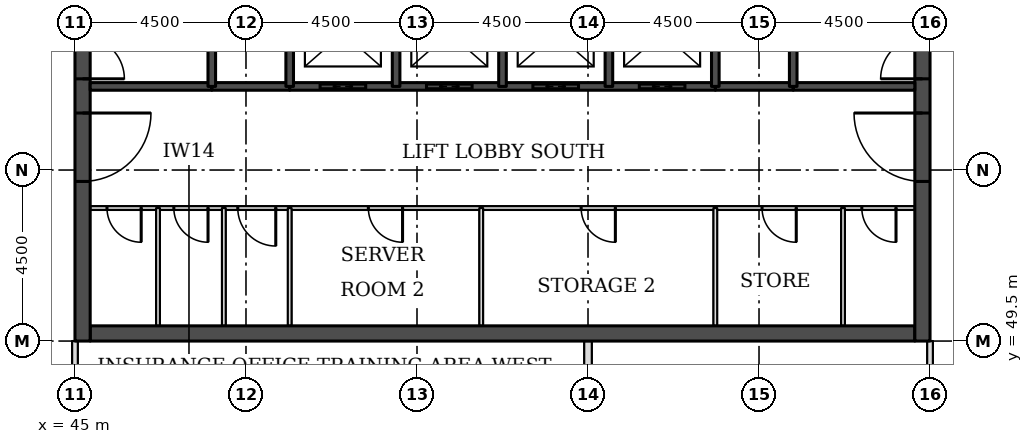
"""IFC4 building model, lengths in metres.
Left out: names, types, materials, properties, quantities, classifications, styles, units other than length and angle.
Written with IfcOpenShell. Run it as: python <this file> out.ifc"""

import sys

from ifc_helpers import new_model, si_unit, direction, frame, frame_2d, origin, place, context, subcontext, project, spatial, rectangle, extrude, element, fill, save


model = new_model("IFC4")
c1 = context("Model", 3, precision=1e-05, world=origin(), true_north=direction((0.0, 1.0)))
c2 = subcontext(c1, "Body", "Model", "MODEL_VIEW")
j1 = project(units=[si_unit("LENGTHUNIT", "METRE"), si_unit("PLANEANGLEUNIT", "RADIAN")], contexts=[c1])
p1 = place(None, origin())
s1 = spatial("IfcSite", under=j1, at=p1, CompositionType="ELEMENT")
p2 = place(p1, origin())
s2 = spatial("IfcBuilding", under=s1, at=p2, CompositionType="ELEMENT")
p3 = place(p2, frame((0.0, 0.0, 215.6)))
s3 = spatial("IfcBuildingStorey", under=s2, at=p3, CompositionType="ELEMENT", Elevation=215.6)
p4 = place(p3, frame((45.4, 49.7, 0.0), z_axis=(0.0, 0.0, 1.0), x_axis=(1.0, 0.0, 0.0)))
e1 = element("IfcWall", 1, at=p4, inside=s3, PredefinedType="SHEAR", context=c2, shape_type="SweptSolid", body=[
    extrude(rectangle(XDim=21.7, YDim=0.4, at=frame_2d((10.85, 0.0))), origin(), (0.0, 0.0, 1.0), 3.7),
])
p5 = place(p3, frame((45.2, 49.5, 0.0), z_axis=(0.0, 0.0, 1.0), x_axis=(0.0, 1.0, 0.0)))
e2 = element("IfcWall", 2, at=p5, inside=s3, PredefinedType="SHEAR", context=c2, shape_type="SweptSolid", body=[
    extrude(rectangle(XDim=22.5, YDim=0.4, at=frame_2d((11.25, 0.0))), origin(), (0.0, 0.0, 1.0), 3.7),
])
p6 = place(p5, frame((4.2, 0.0, 0.0)))
e3 = element("IfcOpeningElement", 3, at=p6, cuts=e2, PredefinedType="OPENING", context=c2, shape_type="SweptSolid", body=[
    extrude(rectangle(XDim=1.8, YDim=2.1, at=frame_2d((0.9, 1.05))), frame((0.0, 0.21, 0.0), z_axis=(0.0, -1.0, 0.0), x_axis=(1.0, 0.0, 0.0)), (0.0, 0.0, 1.0), 0.42),
])
p7 = place(p5, frame((6.9, 0.0, 0.0)))
e4 = element("IfcOpeningElement", 4, at=p7, cuts=e2, PredefinedType="OPENING", context=c2, shape_type="SweptSolid", body=[
    extrude(rectangle(XDim=1.1, YDim=2.1, at=frame_2d((0.55, 1.05))), frame((0.0, 0.21, 0.0), z_axis=(0.0, -1.0, 0.0), x_axis=(1.0, 0.0, 0.0)), (0.0, 0.0, 1.0), 0.42),
])
p8 = place(p5, frame((13.6, 0.0, 0.0)))
e5 = element("IfcOpeningElement", 5, at=p8, cuts=e2, PredefinedType="OPENING", context=c2, shape_type="SweptSolid", body=[
    extrude(rectangle(XDim=1.1, YDim=2.1, at=frame_2d((0.55, 1.05))), frame((0.0, 0.21, 0.0), z_axis=(0.0, -1.0, 0.0), x_axis=(1.0, 0.0, 0.0)), (0.0, 0.0, 1.0), 0.42),
])
p9 = place(p5, frame((16.5, 0.0, 0.0)))
e6 = element("IfcOpeningElement", 6, at=p9, cuts=e2, PredefinedType="OPENING", context=c2, shape_type="SweptSolid", body=[
    extrude(rectangle(XDim=1.8, YDim=2.1, at=frame_2d((0.9, 1.05))), frame((0.0, 0.21, 0.0), z_axis=(0.0, -1.0, 0.0), x_axis=(1.0, 0.0, 0.0)), (0.0, 0.0, 1.0), 0.42),
])
p10 = place(p3, frame((67.3, 49.5, 0.0), z_axis=(0.0, 0.0, 1.0), x_axis=(0.0, 1.0, 0.0)))
e7 = element("IfcWall", 7, at=p10, inside=s3, PredefinedType="SHEAR", context=c2, shape_type="SweptSolid", body=[
    extrude(rectangle(XDim=22.5, YDim=0.4, at=frame_2d((11.25, 0.0))), origin(), (0.0, 0.0, 1.0), 3.7),
])
p11 = place(p10, frame((4.2, 0.0, 0.0)))
e8 = element("IfcOpeningElement", 8, at=p11, cuts=e7, PredefinedType="OPENING", context=c2, shape_type="SweptSolid", body=[
    extrude(rectangle(XDim=1.8, YDim=2.1, at=frame_2d((0.9, 1.05))), frame((0.0, 0.21, 0.0), z_axis=(0.0, -1.0, 0.0), x_axis=(1.0, 0.0, 0.0)), (0.0, 0.0, 1.0), 0.42),
])
p12 = place(p10, frame((6.9, 0.0, 0.0)))
e9 = element("IfcOpeningElement", 9, at=p12, cuts=e7, PredefinedType="OPENING", context=c2, shape_type="SweptSolid", body=[
    extrude(rectangle(XDim=1.1, YDim=2.1, at=frame_2d((0.55, 1.05))), frame((0.0, 0.21, 0.0), z_axis=(0.0, -1.0, 0.0), x_axis=(1.0, 0.0, 0.0)), (0.0, 0.0, 1.0), 0.42),
])
p13 = place(p10, frame((13.6, 0.0, 0.0)))
e10 = element("IfcOpeningElement", 10, at=p13, cuts=e7, PredefinedType="OPENING", context=c2, shape_type="SweptSolid", body=[
    extrude(rectangle(XDim=1.1, YDim=2.1, at=frame_2d((0.55, 1.05))), frame((0.0, 0.21, 0.0), z_axis=(0.0, -1.0, 0.0), x_axis=(1.0, 0.0, 0.0)), (0.0, 0.0, 1.0), 0.42),
])
p14 = place(p10, frame((16.5, 0.0, 0.0)))
e11 = element("IfcOpeningElement", 11, at=p14, cuts=e7, PredefinedType="OPENING", context=c2, shape_type="SweptSolid", body=[
    extrude(rectangle(XDim=1.8, YDim=2.1, at=frame_2d((0.9, 1.05))), frame((0.0, 0.21, 0.0), z_axis=(0.0, -1.0, 0.0), x_axis=(1.0, 0.0, 0.0)), (0.0, 0.0, 1.0), 0.42),
])
p15 = place(p3, frame((58.5, 46.5, 0.0), z_axis=(0.0, 0.0, 1.0), x_axis=(0.0, 1.0, 0.0)))
e12 = element("IfcWall", 12, at=p15, inside=s3, PredefinedType="PARTITIONING", context=c2, shape_type="SweptSolid", body=[
    extrude(rectangle(XDim=3.0, YDim=0.2, at=frame_2d((1.5, 0.0))), origin(), (0.0, 0.0, 1.0), 3.55),
])
for number, where, z_axis, x_axis in (
    (13, (45.0, 48.0, 0.0), (0.0, 0.0, 1.0), (0.0, 1.0, 0.0)),
    (14, (67.5, 48.0, 0.0), (0.0, 0.0, 1.0), (0.0, 1.0, 0.0)),
):
    element("IfcWall", number, at=place(p3, frame(where, z_axis=z_axis, x_axis=x_axis)), inside=s3, PredefinedType="PARTITIONING", context=c2, shape_type="SweptSolid", body=[
        extrude(rectangle(XDim=1.5, YDim=0.15, at=frame_2d((0.75, 0.0))), origin(), (0.0, 0.0, 1.0), 3.022),
    ])
p16 = place(p3, frame((45.4, 53.0, 0.0), z_axis=(0.0, 0.0, 1.0), x_axis=(1.0, 0.0, 0.0)))
e15 = element("IfcWall", 15, at=p16, inside=s3, PredefinedType="PARTITIONING", context=c2, shape_type="SweptSolid", body=[
    extrude(rectangle(XDim=21.7, YDim=0.1, at=frame_2d((10.85, 0.0))), origin(), (0.0, 0.0, 1.0), 3.55),
])
p17 = place(p16, frame((20.305, 0.0, 0.0)))
e16 = element("IfcOpeningElement", 16, at=p17, cuts=e15, PredefinedType="OPENING", context=c2, shape_type="SweptSolid", body=[
    extrude(rectangle(XDim=0.9, YDim=2.1, at=frame_2d((0.45, 1.05))), frame((0.0, 0.06, 0.0), z_axis=(0.0, -1.0, 0.0), x_axis=(1.0, 0.0, 0.0)), (0.0, 0.0, 1.0), 0.12),
])
p18 = place(p16, frame((17.68, 0.0, 0.0)))
e17 = element("IfcOpeningElement", 17, at=p18, cuts=e15, PredefinedType="OPENING", context=c2, shape_type="SweptSolid", body=[
    extrude(rectangle(XDim=0.9, YDim=2.1, at=frame_2d((0.45, 1.05))), frame((0.0, 0.06, 0.0), z_axis=(0.0, -1.0, 0.0), x_axis=(1.0, 0.0, 0.0)), (0.0, 0.0, 1.0), 0.12),
])
p19 = place(p16, frame((0.442, 0.0, 0.0)))
e18 = element("IfcOpeningElement", 18, at=p19, cuts=e15, PredefinedType="OPENING", context=c2, shape_type="SweptSolid", body=[
    extrude(rectangle(XDim=0.9, YDim=2.1, at=frame_2d((0.45, 1.05))), frame((0.0, 0.06, 0.0), z_axis=(0.0, -1.0, 0.0), x_axis=(1.0, 0.0, 0.0)), (0.0, 0.0, 1.0), 0.12),
])
p20 = place(p16, frame((2.201, 0.0, 0.0)))
e19 = element("IfcOpeningElement", 19, at=p20, cuts=e15, PredefinedType="OPENING", context=c2, shape_type="SweptSolid", body=[
    extrude(rectangle(XDim=0.9, YDim=2.1, at=frame_2d((0.45, 1.05))), frame((0.0, 0.06, 0.0), z_axis=(0.0, -1.0, 0.0), x_axis=(1.0, 0.0, 0.0)), (0.0, 0.0, 1.0), 0.12),
])
p21 = place(p16, frame((3.884, 0.0, 0.0)))
e20 = element("IfcOpeningElement", 20, at=p21, cuts=e15, PredefinedType="OPENING", context=c2, shape_type="SweptSolid", body=[
    extrude(rectangle(XDim=1.0, YDim=2.1, at=frame_2d((0.5, 1.05))), frame((0.0, 0.06, 0.0), z_axis=(0.0, -1.0, 0.0), x_axis=(1.0, 0.0, 0.0)), (0.0, 0.0, 1.0), 0.12),
])
p22 = place(p16, frame((7.32, 0.0, 0.0)))
e21 = element("IfcOpeningElement", 21, at=p22, cuts=e15, PredefinedType="OPENING", context=c2, shape_type="SweptSolid", body=[
    extrude(rectangle(XDim=0.9, YDim=2.1, at=frame_2d((0.45, 1.05))), frame((0.0, 0.06, 0.0), z_axis=(0.0, -1.0, 0.0), x_axis=(1.0, 0.0, 0.0)), (0.0, 0.0, 1.0), 0.12),
])
p23 = place(p16, frame((12.92, 0.0, 0.0)))
e22 = element("IfcOpeningElement", 22, at=p23, cuts=e15, PredefinedType="OPENING", context=c2, shape_type="SweptSolid", body=[
    extrude(rectangle(XDim=0.9, YDim=2.1, at=frame_2d((0.45, 1.05))), frame((0.0, 0.06, 0.0), z_axis=(0.0, -1.0, 0.0), x_axis=(1.0, 0.0, 0.0)), (0.0, 0.0, 1.0), 0.12),
])
for number, where, z_axis, x_axis in (
    (23, (48.6, 56.2, 0.0), (0.0, 0.0, 1.0), (1.0, 0.0, 0.0)),
    (24, (61.85, 56.2, 0.0), (0.0, 0.0, 1.0), (1.0, 0.0, 0.0)),
):
    element("IfcWall", number, at=place(p3, frame(where, z_axis=z_axis, x_axis=x_axis)), inside=s3, PredefinedType="SOLIDWALL", context=c2, shape_type="SweptSolid", body=[
        extrude(rectangle(XDim=2.05, YDim=0.2, at=frame_2d((1.025, 0.0))), origin(), (0.0, 0.0, 1.0), 3.55),
    ])
p24 = place(p3, frame((45.4, 56.2, 0.0), z_axis=(0.0, 0.0, 1.0), x_axis=(1.0, 0.0, 0.0)))
e25 = element("IfcWall", 25, at=p24, inside=s3, PredefinedType="SOLIDWALL", context=c2, shape_type="SweptSolid", body=[
    extrude(rectangle(XDim=3.2, YDim=0.2, at=frame_2d((1.6, 0.0))), origin(), (0.0, 0.0, 1.0), 3.55),
])
p25 = place(p3, frame((50.65, 56.2, 0.0), z_axis=(0.0, 0.0, 1.0), x_axis=(1.0, 0.0, 0.0)))
e26 = element("IfcWall", 26, at=p25, inside=s3, PredefinedType="SOLIDWALL", context=c2, shape_type="SweptSolid", body=[
    extrude(rectangle(XDim=11.2, YDim=0.2, at=frame_2d((5.6, 0.0))), origin(), (0.0, 0.0, 1.0), 3.55),
])
p26 = place(p25, frame((0.8, 0.0, 0.0)))
e27 = element("IfcOpeningElement", 27, at=p26, cuts=e26, PredefinedType="OPENING", context=c2, shape_type="SweptSolid", body=[
    extrude(rectangle(XDim=1.2, YDim=2.1, at=frame_2d((0.6, 1.05))), frame((0.0, 0.11, 0.0), z_axis=(0.0, -1.0, 0.0), x_axis=(1.0, 0.0, 0.0)), (0.0, 0.0, 1.0), 0.22),
])
p27 = place(p25, frame((3.6, 0.0, 0.0)))
e28 = element("IfcOpeningElement", 28, at=p27, cuts=e26, PredefinedType="OPENING", context=c2, shape_type="SweptSolid", body=[
    extrude(rectangle(XDim=1.2, YDim=2.1, at=frame_2d((0.6, 1.05))), frame((0.0, 0.11, 0.0), z_axis=(0.0, -1.0, 0.0), x_axis=(1.0, 0.0, 0.0)), (0.0, 0.0, 1.0), 0.22),
])
p28 = place(p25, frame((6.4, 0.0, 0.0)))
e29 = element("IfcOpeningElement", 29, at=p28, cuts=e26, PredefinedType="OPENING", context=c2, shape_type="SweptSolid", body=[
    extrude(rectangle(XDim=1.2, YDim=2.1, at=frame_2d((0.6, 1.05))), frame((0.0, 0.11, 0.0), z_axis=(0.0, -1.0, 0.0), x_axis=(1.0, 0.0, 0.0)), (0.0, 0.0, 1.0), 0.22),
])
p29 = place(p25, frame((9.2, 0.0, 0.0)))
e30 = element("IfcOpeningElement", 30, at=p29, cuts=e26, PredefinedType="OPENING", context=c2, shape_type="SweptSolid", body=[
    extrude(rectangle(XDim=1.2, YDim=2.1, at=frame_2d((0.6, 1.05))), frame((0.0, 0.11, 0.0), z_axis=(0.0, -1.0, 0.0), x_axis=(1.0, 0.0, 0.0)), (0.0, 0.0, 1.0), 0.22),
])
p30 = place(p3, frame((63.9, 56.2, 0.0), z_axis=(0.0, 0.0, 1.0), x_axis=(1.0, 0.0, 0.0)))
e31 = element("IfcWall", 31, at=p30, inside=s3, PredefinedType="SOLIDWALL", context=c2, shape_type="SweptSolid", body=[
    extrude(rectangle(XDim=3.2, YDim=0.2, at=frame_2d((1.6, 0.0))), origin(), (0.0, 0.0, 1.0), 3.55),
])
p31 = place(p3, frame((47.185, 49.9, 0.0), z_axis=(0.0, 0.0, 1.0), x_axis=(0.0, 1.0, 0.0)))
e32 = element("IfcWall", 32, at=p31, inside=s3, PredefinedType="PARTITIONING", context=c2, shape_type="SweptSolid", body=[
    extrude(rectangle(XDim=3.1, YDim=0.1, at=frame_2d((1.55, 0.0))), origin(), (0.0, 0.0, 1.0), 3.55),
])
p32 = place(p3, frame((48.6, 56.2, 0.0), z_axis=(0.0, 0.0, 1.0), x_axis=(0.0, 1.0, 0.0)))
e33 = element("IfcWall", 33, at=p32, inside=s3, PredefinedType="SOLIDWALL", context=c2, shape_type="SweptSolid", body=[
    extrude(rectangle(XDim=5.8, YDim=0.2, at=frame_2d((2.9, 0.0))), origin(), (0.0, 0.0, 1.0), 3.55),
])
for number, where, z_axis, x_axis in (
    (34, (48.917, 49.9, 0.0), (0.0, 0.0, 1.0), (0.0, 1.0, 0.0)),
    (35, (50.65, 49.9, 0.0), (0.0, 0.0, 1.0), (0.0, 1.0, 0.0)),
):
    element("IfcWall", number, at=place(p3, frame(where, z_axis=z_axis, x_axis=x_axis)), inside=s3, PredefinedType="PARTITIONING", context=c2, shape_type="SweptSolid", body=[
        extrude(rectangle(XDim=3.1, YDim=0.1, at=frame_2d((1.55, 0.0))), origin(), (0.0, 0.0, 1.0), 3.55),
    ])
for number, where, z_axis, x_axis in (
    (36, (50.65, 56.2, 0.0), (0.0, 0.0, 1.0), (0.0, 1.0, 0.0)),
    (37, (53.45, 56.2, 0.0), (0.0, 0.0, 1.0), (0.0, 1.0, 0.0)),
):
    element("IfcWall", number, at=place(p3, frame(where, z_axis=z_axis, x_axis=x_axis)), inside=s3, PredefinedType="SOLIDWALL", context=c2, shape_type="SweptSolid", body=[
        extrude(rectangle(XDim=2.8, YDim=0.2, at=frame_2d((1.4, 0.0))), origin(), (0.0, 0.0, 1.0), 3.55),
    ])
p33 = place(p3, frame((55.69, 49.9, 0.0), z_axis=(0.0, 0.0, 1.0), x_axis=(0.0, 1.0, 0.0)))
e38 = element("IfcWall", 38, at=p33, inside=s3, PredefinedType="PARTITIONING", context=c2, shape_type="SweptSolid", body=[
    extrude(rectangle(XDim=3.1, YDim=0.1, at=frame_2d((1.55, 0.0))), origin(), (0.0, 0.0, 1.0), 3.55),
])
for number, where, z_axis, x_axis in (
    (39, (56.25, 56.2, 0.0), (0.0, 0.0, 1.0), (0.0, 1.0, 0.0)),
    (40, (59.05, 56.2, 0.0), (0.0, 0.0, 1.0), (0.0, 1.0, 0.0)),
):
    element("IfcWall", number, at=place(p3, frame(where, z_axis=z_axis, x_axis=x_axis)), inside=s3, PredefinedType="SOLIDWALL", context=c2, shape_type="SweptSolid", body=[
        extrude(rectangle(XDim=2.8, YDim=0.2, at=frame_2d((1.4, 0.0))), origin(), (0.0, 0.0, 1.0), 3.55),
    ])
p34 = place(p3, frame((61.85, 49.9, 0.0), z_axis=(0.0, 0.0, 1.0), x_axis=(0.0, 1.0, 0.0)))
e41 = element("IfcWall", 41, at=p34, inside=s3, PredefinedType="PARTITIONING", context=c2, shape_type="SweptSolid", body=[
    extrude(rectangle(XDim=3.1, YDim=0.1, at=frame_2d((1.55, 0.0))), origin(), (0.0, 0.0, 1.0), 3.55),
])
p35 = place(p3, frame((61.85, 56.2, 0.0), z_axis=(0.0, 0.0, 1.0), x_axis=(0.0, 1.0, 0.0)))
e42 = element("IfcWall", 42, at=p35, inside=s3, PredefinedType="SOLIDWALL", context=c2, shape_type="SweptSolid", body=[
    extrude(rectangle(XDim=2.8, YDim=0.2, at=frame_2d((1.4, 0.0))), origin(), (0.0, 0.0, 1.0), 3.55),
])
p36 = place(p3, frame((63.9, 56.2, 0.0), z_axis=(0.0, 0.0, 1.0), x_axis=(0.0, 1.0, 0.0)))
e43 = element("IfcWall", 43, at=p36, inside=s3, PredefinedType="SOLIDWALL", context=c2, shape_type="SweptSolid", body=[
    extrude(rectangle(XDim=5.8, YDim=0.2, at=frame_2d((2.9, 0.0))), origin(), (0.0, 0.0, 1.0), 3.55),
])
p37 = place(p3, frame((65.21, 49.9, 0.0), z_axis=(0.0, 0.0, 1.0), x_axis=(0.0, 1.0, 0.0)))
e44 = element("IfcWall", 44, at=p37, inside=s3, PredefinedType="PARTITIONING", context=c2, shape_type="SweptSolid", body=[
    extrude(rectangle(XDim=3.1, YDim=0.1, at=frame_2d((1.55, 0.0))), origin(), (0.0, 0.0, 1.0), 3.55),
])
p38 = place(p26, origin())
e45 = element("IfcDoor", 45, at=p38, inside=s3, OperationType="DOUBLE_DOOR_SLIDING", PredefinedType="DOOR", context=c2, shape_type="SweptSolid", body=[
    extrude(rectangle(XDim=1.2, YDim=2.1, at=frame_2d((0.6, 1.05))), frame((0.0, 0.025, 0.0), z_axis=(0.0, -1.0, 0.0), x_axis=(1.0, 0.0, 0.0)), (0.0, 0.0, 1.0), 0.05),
])
fill(e27, e45)
p39 = place(p27, origin())
e46 = element("IfcDoor", 46, at=p39, inside=s3, OperationType="DOUBLE_DOOR_SLIDING", PredefinedType="DOOR", context=c2, shape_type="SweptSolid", body=[
    extrude(rectangle(XDim=1.2, YDim=2.1, at=frame_2d((0.6, 1.05))), frame((0.0, 0.025, 0.0), z_axis=(0.0, -1.0, 0.0), x_axis=(1.0, 0.0, 0.0)), (0.0, 0.0, 1.0), 0.05),
])
fill(e28, e46)
p40 = place(p28, origin())
e47 = element("IfcDoor", 47, at=p40, inside=s3, OperationType="DOUBLE_DOOR_SLIDING", PredefinedType="DOOR", context=c2, shape_type="SweptSolid", body=[
    extrude(rectangle(XDim=1.2, YDim=2.1, at=frame_2d((0.6, 1.05))), frame((0.0, 0.025, 0.0), z_axis=(0.0, -1.0, 0.0), x_axis=(1.0, 0.0, 0.0)), (0.0, 0.0, 1.0), 0.05),
])
fill(e29, e47)
p41 = place(p29, origin())
e48 = element("IfcDoor", 48, at=p41, inside=s3, OperationType="DOUBLE_DOOR_SLIDING", PredefinedType="DOOR", context=c2, shape_type="SweptSolid", body=[
    extrude(rectangle(XDim=1.2, YDim=2.1, at=frame_2d((0.6, 1.05))), frame((0.0, 0.025, 0.0), z_axis=(0.0, -1.0, 0.0), x_axis=(1.0, 0.0, 0.0)), (0.0, 0.0, 1.0), 0.05),
])
fill(e30, e48)
p42 = place(p6, frame((1.8, 0.0, 0.0), z_axis=(0.0, 0.0, 1.0), x_axis=(-1.0, 0.0, 0.0)))
e49 = element("IfcDoor", 49, at=p42, inside=s3, OperationType="SINGLE_SWING_LEFT", PredefinedType="DOOR", context=c2, shape_type="SweptSolid", body=[
    extrude(rectangle(XDim=1.8, YDim=2.1, at=frame_2d((0.9, 1.05))), frame((0.0, 0.025, 0.0), z_axis=(0.0, -1.0, 0.0), x_axis=(1.0, 0.0, 0.0)), (0.0, 0.0, 1.0), 0.05),
])
fill(e3, e49)
p43 = place(p7, frame((1.1, 0.0, 0.0), z_axis=(0.0, 0.0, 1.0), x_axis=(-1.0, 0.0, 0.0)))
e50 = element("IfcDoor", 50, at=p43, inside=s3, OperationType="SINGLE_SWING_RIGHT", PredefinedType="DOOR", context=c2, shape_type="SweptSolid", body=[
    extrude(rectangle(XDim=1.1, YDim=2.1, at=frame_2d((0.55, 1.05))), frame((0.0, 0.025, 0.0), z_axis=(0.0, -1.0, 0.0), x_axis=(1.0, 0.0, 0.0)), (0.0, 0.0, 1.0), 0.05),
])
fill(e4, e50)
p44 = place(p11, origin())
e51 = element("IfcDoor", 51, at=p44, inside=s3, OperationType="SINGLE_SWING_RIGHT", PredefinedType="DOOR", context=c2, shape_type="SweptSolid", body=[
    extrude(rectangle(XDim=1.8, YDim=2.1, at=frame_2d((0.9, 1.05))), frame((0.0, 0.025, 0.0), z_axis=(0.0, -1.0, 0.0), x_axis=(1.0, 0.0, 0.0)), (0.0, 0.0, 1.0), 0.05),
])
fill(e8, e51)
p45 = place(p12, origin())
e52 = element("IfcDoor", 52, at=p45, inside=s3, OperationType="SINGLE_SWING_LEFT", PredefinedType="DOOR", context=c2, shape_type="SweptSolid", body=[
    extrude(rectangle(XDim=1.1, YDim=2.1, at=frame_2d((0.55, 1.05))), frame((0.0, 0.025, 0.0), z_axis=(0.0, -1.0, 0.0), x_axis=(1.0, 0.0, 0.0)), (0.0, 0.0, 1.0), 0.05),
])
fill(e9, e52)
p46 = place(p17, frame((0.9, 0.0, 0.0), z_axis=(0.0, 0.0, 1.0), x_axis=(-1.0, 0.0, 0.0)))
e53 = element("IfcDoor", 53, at=p46, inside=s3, OperationType="SINGLE_SWING_LEFT", PredefinedType="DOOR", context=c2, shape_type="SweptSolid", body=[
    extrude(rectangle(XDim=0.9, YDim=2.1, at=frame_2d((0.45, 1.05))), frame((0.0, 0.025, 0.0), z_axis=(0.0, -1.0, 0.0), x_axis=(1.0, 0.0, 0.0)), (0.0, 0.0, 1.0), 0.05),
])
fill(e16, e53)
p47 = place(p18, frame((0.9, 0.0, 0.0), z_axis=(0.0, 0.0, 1.0), x_axis=(-1.0, 0.0, 0.0)))
e54 = element("IfcDoor", 54, at=p47, inside=s3, OperationType="SINGLE_SWING_LEFT", PredefinedType="DOOR", context=c2, shape_type="SweptSolid", body=[
    extrude(rectangle(XDim=0.9, YDim=2.1, at=frame_2d((0.45, 1.05))), frame((0.0, 0.025, 0.0), z_axis=(0.0, -1.0, 0.0), x_axis=(1.0, 0.0, 0.0)), (0.0, 0.0, 1.0), 0.05),
])
fill(e17, e54)
p48 = place(p19, frame((0.9, 0.0, 0.0), z_axis=(0.0, 0.0, 1.0), x_axis=(-1.0, 0.0, 0.0)))
e55 = element("IfcDoor", 55, at=p48, inside=s3, OperationType="SINGLE_SWING_LEFT", PredefinedType="DOOR", context=c2, shape_type="SweptSolid", body=[
    extrude(rectangle(XDim=0.9, YDim=2.1, at=frame_2d((0.45, 1.05))), frame((0.0, 0.025, 0.0), z_axis=(0.0, -1.0, 0.0), x_axis=(1.0, 0.0, 0.0)), (0.0, 0.0, 1.0), 0.05),
])
fill(e18, e55)
p49 = place(p20, frame((0.9, 0.0, 0.0), z_axis=(0.0, 0.0, 1.0), x_axis=(-1.0, 0.0, 0.0)))
e56 = element("IfcDoor", 56, at=p49, inside=s3, OperationType="SINGLE_SWING_LEFT", PredefinedType="DOOR", context=c2, shape_type="SweptSolid", body=[
    extrude(rectangle(XDim=0.9, YDim=2.1, at=frame_2d((0.45, 1.05))), frame((0.0, 0.025, 0.0), z_axis=(0.0, -1.0, 0.0), x_axis=(1.0, 0.0, 0.0)), (0.0, 0.0, 1.0), 0.05),
])
fill(e19, e56)
p50 = place(p21, frame((1.0, 0.0, 0.0), z_axis=(0.0, 0.0, 1.0), x_axis=(-1.0, 0.0, 0.0)))
e57 = element("IfcDoor", 57, at=p50, inside=s3, OperationType="SINGLE_SWING_LEFT", PredefinedType="DOOR", context=c2, shape_type="SweptSolid", body=[
    extrude(rectangle(XDim=1.0, YDim=2.1, at=frame_2d((0.5, 1.05))), frame((0.0, 0.025, 0.0), z_axis=(0.0, -1.0, 0.0), x_axis=(1.0, 0.0, 0.0)), (0.0, 0.0, 1.0), 0.05),
])
fill(e20, e57)
p51 = place(p22, frame((0.9, 0.0, 0.0), z_axis=(0.0, 0.0, 1.0), x_axis=(-1.0, 0.0, 0.0)))
e58 = element("IfcDoor", 58, at=p51, inside=s3, OperationType="SINGLE_SWING_LEFT", PredefinedType="DOOR", context=c2, shape_type="SweptSolid", body=[
    extrude(rectangle(XDim=0.9, YDim=2.1, at=frame_2d((0.45, 1.05))), frame((0.0, 0.025, 0.0), z_axis=(0.0, -1.0, 0.0), x_axis=(1.0, 0.0, 0.0)), (0.0, 0.0, 1.0), 0.05),
])
fill(e21, e58)
p52 = place(p23, frame((0.9, 0.0, 0.0), z_axis=(0.0, 0.0, 1.0), x_axis=(-1.0, 0.0, 0.0)))
e59 = element("IfcDoor", 59, at=p52, inside=s3, OperationType="SINGLE_SWING_LEFT", PredefinedType="DOOR", context=c2, shape_type="SweptSolid", body=[
    extrude(rectangle(XDim=0.9, YDim=2.1, at=frame_2d((0.45, 1.05))), frame((0.0, 0.025, 0.0), z_axis=(0.0, -1.0, 0.0), x_axis=(1.0, 0.0, 0.0)), (0.0, 0.0, 1.0), 0.05),
])
fill(e22, e59)
save(model, sys.argv[1])
